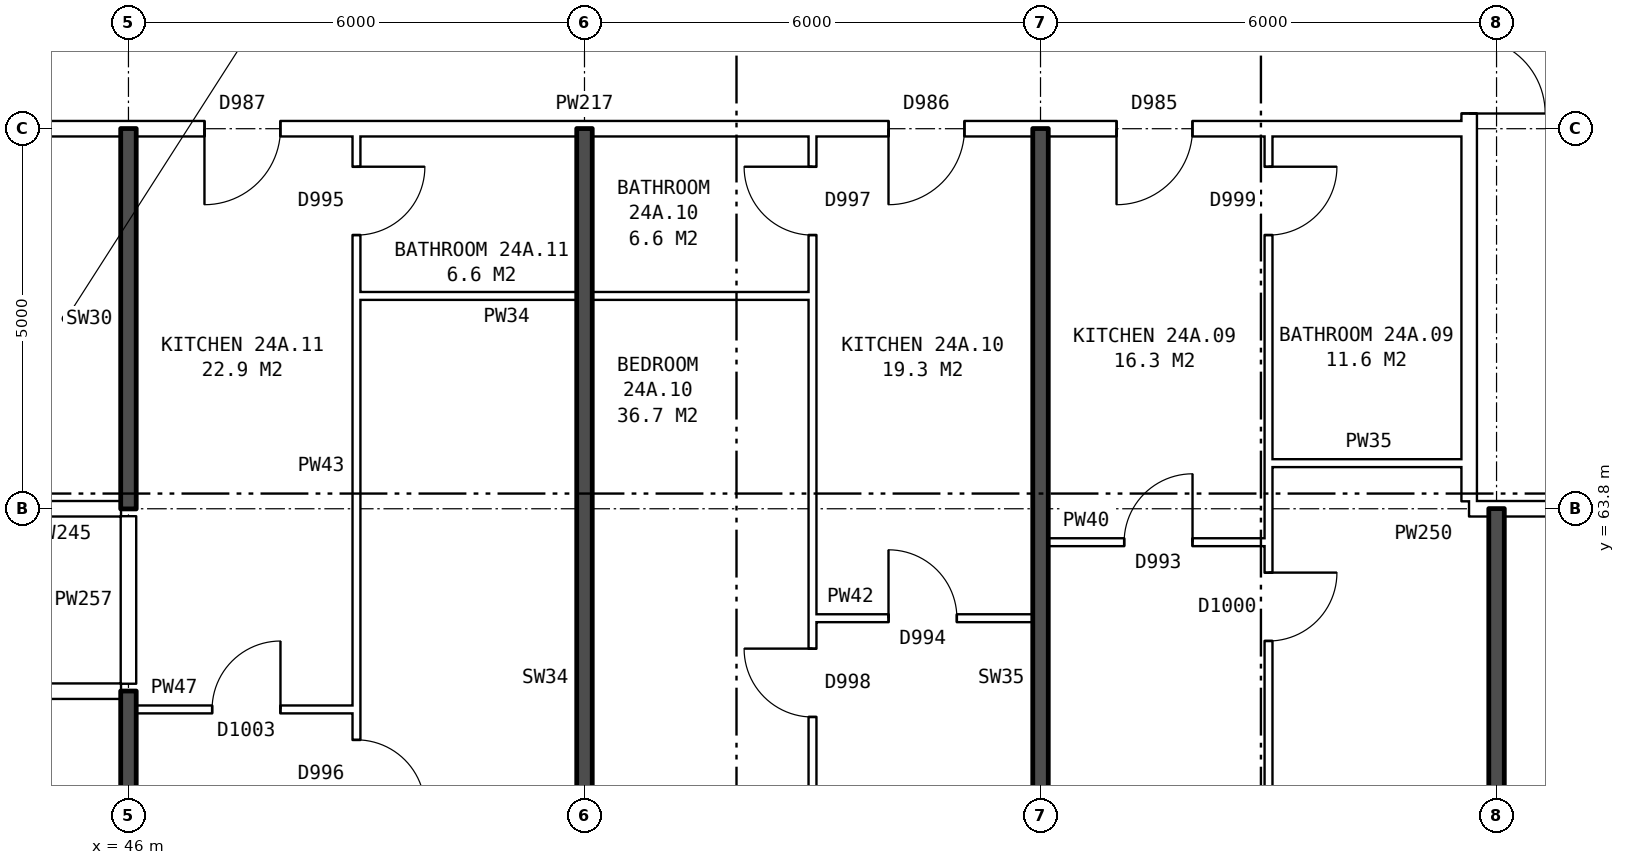
"""IFC4 building model, lengths in metres.
Left out: names, types, materials, properties, quantities, classifications, styles, units other than length and angle.
Written with IfcOpenShell. Run it as: python <this file> out.ifc"""

import sys

from ifc_helpers import new_model, si_unit, direction, frame, frame_2d, origin, place, context, subcontext, project, spatial, rectangle, extrude, element, fill, save


model = new_model("IFC4")
c1 = context("Model", 3, precision=1e-05, world=origin(), true_north=direction((0.0, 1.0)))
c2 = subcontext(c1, "Body", "Model", "MODEL_VIEW")
j1 = project(units=[si_unit("LENGTHUNIT", "METRE"), si_unit("PLANEANGLEUNIT", "RADIAN")], contexts=[c1])
p1 = place(None, origin())
s1 = spatial("IfcSite", under=j1, at=p1, CompositionType="ELEMENT")
p2 = place(p1, origin())
s2 = spatial("IfcBuilding", under=s1, at=p2, CompositionType="ELEMENT")
p3 = place(p2, frame((0.0, 0.0, 87.1)))
s3 = spatial("IfcBuildingStorey", under=s2, at=p3, CompositionType="ELEMENT", Elevation=87.1)
p4 = place(p3, frame((63.64, 63.9, 0.0), z_axis=(0.0, 0.0, 1.0), x_axis=(0.0, 1.0, 0.0)))
e1 = element("IfcWall", 1, at=p4, inside=s3, PredefinedType="PARTITIONING", context=c2, shape_type="SweptSolid", body=[
    extrude(rectangle(XDim=12.2, YDim=0.2, at=frame_2d((6.1, 0.0))), origin(), (0.0, 0.0, 1.0), 2.85),
])
p5 = place(p4, frame((5.1, 0.0, 0.0)))
e2 = element("IfcOpeningElement", 2, at=p5, cuts=e1, PredefinedType="OPENING", context=c2, shape_type="SweptSolid", body=[
    extrude(rectangle(XDim=2.0, YDim=2.1, at=frame_2d((1.0, 1.05))), frame((0.0, 0.11, 0.0), z_axis=(0.0, -1.0, 0.0), x_axis=(1.0, 0.0, 0.0)), (0.0, 0.0, 1.0), 0.22),
])
p6 = place(p3, frame((46.1, 61.16, 0.0), z_axis=(0.0, 0.0, 1.0), x_axis=(1.0, 0.0, 0.0)))
e3 = element("IfcWall", 3, at=p6, inside=s3, PredefinedType="PARTITIONING", context=c2, shape_type="SweptSolid", body=[
    extrude(rectangle(XDim=2.9, YDim=0.1, at=frame_2d((1.45, 0.0))), origin(), (0.0, 0.0, 1.0), 2.85),
])
p7 = place(p6, frame((1.0, 0.0, 0.0)))
e4 = element("IfcOpeningElement", 4, at=p7, cuts=e3, PredefinedType="OPENING", context=c2, shape_type="SweptSolid", body=[
    extrude(rectangle(XDim=0.9, YDim=2.1, at=frame_2d((0.45, 1.05))), frame((0.0, 0.06, 0.0), z_axis=(0.0, -1.0, 0.0), x_axis=(1.0, 0.0, 0.0)), (0.0, 0.0, 1.0), 0.12),
])
p8 = place(p3, frame((23.61, 61.4, 0.0), z_axis=(0.0, 0.0, 1.0), x_axis=(1.0, 0.0, 0.0)))
e5 = element("IfcWall", 5, at=p8, inside=s3, PredefinedType="PARTITIONING", context=c2, shape_type="SweptSolid", body=[
    extrude(rectangle(XDim=22.29, YDim=0.2, at=frame_2d((11.145, 0.0))), origin(), (0.0, 0.0, 1.0), 2.85),
])
p9 = place(p8, frame((18.84, 0.0, 0.0)))
e6 = element("IfcOpeningElement", 6, at=p9, cuts=e5, PredefinedType="OPENING", context=c2, shape_type="SweptSolid", body=[
    extrude(rectangle(XDim=1.0, YDim=2.1, at=frame_2d((0.5, 1.05))), frame((0.0, 0.11, 0.0), z_axis=(0.0, -1.0, 0.0), x_axis=(1.0, 0.0, 0.0)), (0.0, 0.0, 1.0), 0.22),
])
p10 = place(p8, frame((6.89, 0.0, 0.0)))
e7 = element("IfcOpeningElement", 7, at=p10, cuts=e5, PredefinedType="OPENING", context=c2, shape_type="SweptSolid", body=[
    extrude(rectangle(XDim=1.0, YDim=2.1, at=frame_2d((0.5, 1.05))), frame((0.0, 0.11, 0.0), z_axis=(0.0, -1.0, 0.0), x_axis=(1.0, 0.0, 0.0)), (0.0, 0.0, 1.0), 0.22),
])
p11 = place(p3, frame((55.0, 62.36, 0.0), z_axis=(0.0, 0.0, 1.0), x_axis=(1.0, 0.0, 0.0)))
e8 = element("IfcWall", 8, at=p11, inside=s3, PredefinedType="PARTITIONING", context=c2, shape_type="SweptSolid", body=[
    extrude(rectangle(XDim=2.9, YDim=0.1, at=frame_2d((1.45, 0.0))), origin(), (0.0, 0.0, 1.0), 2.85),
])
p12 = place(p11, frame((1.0, 0.0, 0.0)))
e9 = element("IfcOpeningElement", 9, at=p12, cuts=e8, PredefinedType="OPENING", context=c2, shape_type="SweptSolid", body=[
    extrude(rectangle(XDim=0.9, YDim=2.1, at=frame_2d((0.45, 1.05))), frame((0.0, 0.06, 0.0), z_axis=(0.0, -1.0, 0.0), x_axis=(1.0, 0.0, 0.0)), (0.0, 0.0, 1.0), 0.12),
])
p13 = place(p3, frame((58.1, 63.36, 0.0), z_axis=(0.0, 0.0, 1.0), x_axis=(1.0, 0.0, 0.0)))
e10 = element("IfcWall", 10, at=p13, inside=s3, PredefinedType="PARTITIONING", context=c2, shape_type="SweptSolid", body=[
    extrude(rectangle(XDim=2.9, YDim=0.1, at=frame_2d((1.45, 0.0))), origin(), (0.0, 0.0, 1.0), 2.85),
])
p14 = place(p13, frame((1.0, 0.0, 0.0)))
e11 = element("IfcOpeningElement", 11, at=p14, cuts=e10, PredefinedType="OPENING", context=c2, shape_type="SweptSolid", body=[
    extrude(rectangle(XDim=0.9, YDim=2.1, at=frame_2d((0.45, 1.05))), frame((0.0, 0.06, 0.0), z_axis=(0.0, -1.0, 0.0), x_axis=(1.0, 0.0, 0.0)), (0.0, 0.0, 1.0), 0.12),
])
p15 = place(p3, frame((44.36, 63.8, 0.0), z_axis=(0.0, 0.0, 1.0), x_axis=(1.0, 0.0, 0.0)))
e12 = element("IfcWall", 12, at=p15, inside=s3, PredefinedType="PARTITIONING", context=c2, shape_type="SweptSolid", body=[
    extrude(rectangle(XDim=1.54, YDim=0.2, at=frame_2d((0.77, 0.0))), origin(), (0.0, 0.0, 1.0), 2.85),
])
p16 = place(p3, frame((63.64, 63.8, 0.0), z_axis=(0.0, 0.0, 1.0), x_axis=(1.0, 0.0, 0.0)))
e13 = element("IfcWall", 13, at=p16, inside=s3, PredefinedType="PARTITIONING", context=c2, shape_type="SweptSolid", body=[
    extrude(rectangle(XDim=3.0, YDim=0.2, at=frame_2d((1.5, 0.0))), origin(), (0.0, 0.0, 1.0), 2.85),
])
p17 = place(p16, frame((1.18, 0.0, 0.0)))
e14 = element("IfcOpeningElement", 14, at=p17, cuts=e13, PredefinedType="OPENING", context=c2, shape_type="SweptSolid", body=[
    extrude(rectangle(XDim=1.0, YDim=2.1, at=frame_2d((0.5, 1.05))), frame((0.0, 0.11, 0.0), z_axis=(0.0, -1.0, 0.0), x_axis=(1.0, 0.0, 0.0)), (0.0, 0.0, 1.0), 0.22),
])
p18 = place(p3, frame((61.0, 64.4, 0.0), z_axis=(0.0, 0.0, 1.0), x_axis=(1.0, 0.0, 0.0)))
e15 = element("IfcWall", 15, at=p18, inside=s3, PredefinedType="PARTITIONING", context=c2, shape_type="SweptSolid", body=[
    extrude(rectangle(XDim=2.64, YDim=0.1, at=frame_2d((1.32, 0.0))), origin(), (0.0, 0.0, 1.0), 2.85),
])
p19 = place(p3, frame((49.0, 66.6, 0.0), z_axis=(0.0, 0.0, 1.0), x_axis=(1.0, 0.0, 0.0)))
e16 = element("IfcWall", 16, at=p19, inside=s3, PredefinedType="PARTITIONING", context=c2, shape_type="SweptSolid", body=[
    extrude(rectangle(XDim=6.0, YDim=0.1, at=frame_2d((3.0, 0.0))), origin(), (0.0, 0.0, 1.0), 2.85),
])
p20 = place(p3, frame((44.36, 68.8, 0.0), z_axis=(0.0, 0.0, 1.0), x_axis=(1.0, 0.0, 0.0)))
e17 = element("IfcWall", 17, at=p20, inside=s3, PredefinedType="PARTITIONING", context=c2, shape_type="SweptSolid", body=[
    extrude(rectangle(XDim=19.28, YDim=0.2, at=frame_2d((9.64, 0.0))), origin(), (0.0, 0.0, 1.0), 2.85),
])
p21 = place(p20, frame((14.64, 0.0, 0.0)))
e18 = element("IfcOpeningElement", 18, at=p21, cuts=e17, PredefinedType="OPENING", context=c2, shape_type="SweptSolid", body=[
    extrude(rectangle(XDim=1.0, YDim=2.1, at=frame_2d((0.5, 1.05))), frame((0.0, 0.11, 0.0), z_axis=(0.0, -1.0, 0.0), x_axis=(1.0, 0.0, 0.0)), (0.0, 0.0, 1.0), 0.22),
])
p22 = place(p20, frame((11.64, 0.0, 0.0)))
e19 = element("IfcOpeningElement", 19, at=p22, cuts=e17, PredefinedType="OPENING", context=c2, shape_type="SweptSolid", body=[
    extrude(rectangle(XDim=1.0, YDim=2.1, at=frame_2d((0.5, 1.05))), frame((0.0, 0.11, 0.0), z_axis=(0.0, -1.0, 0.0), x_axis=(1.0, 0.0, 0.0)), (0.0, 0.0, 1.0), 0.22),
])
p23 = place(p20, frame((2.64, 0.0, 0.0)))
e20 = element("IfcOpeningElement", 20, at=p23, cuts=e17, PredefinedType="OPENING", context=c2, shape_type="SweptSolid", body=[
    extrude(rectangle(XDim=1.0, YDim=2.1, at=frame_2d((0.5, 1.05))), frame((0.0, 0.11, 0.0), z_axis=(0.0, -1.0, 0.0), x_axis=(1.0, 0.0, 0.0)), (0.0, 0.0, 1.0), 0.22),
])
p24 = place(p3, frame((46.0, 54.36, 0.0), z_axis=(0.0, 0.0, 1.0), x_axis=(0.0, 1.0, 0.0)))
e21 = element("IfcWall", 21, at=p24, inside=s3, PredefinedType="SOLIDWALL", context=c2, shape_type="SweptSolid", body=[
    extrude(rectangle(XDim=7.04, YDim=0.2, at=frame_2d((3.52, 0.0))), origin(), (0.0, 0.0, 1.0), 2.85),
])
p25 = place(p3, frame((46.0, 61.5, 0.0), z_axis=(0.0, 0.0, 1.0), x_axis=(0.0, 1.0, 0.0)))
e22 = element("IfcWall", 22, at=p25, inside=s3, PredefinedType="PARTITIONING", context=c2, shape_type="SweptSolid", body=[
    extrude(rectangle(XDim=2.2, YDim=0.2, at=frame_2d((1.1, 0.0))), origin(), (0.0, 0.0, 1.0), 2.85),
])
p26 = place(p3, frame((46.0, 63.8, 0.0), z_axis=(0.0, 0.0, 1.0), x_axis=(0.0, 1.0, 0.0)))
e23 = element("IfcWall", 23, at=p26, inside=s3, PredefinedType="SOLIDWALL", context=c2, shape_type="SweptSolid", body=[
    extrude(rectangle(XDim=5.0, YDim=0.2, at=frame_2d((2.5, 0.0))), origin(), (0.0, 0.0, 1.0), 2.85),
])
p27 = place(p3, frame((49.0, 54.36, 0.0), z_axis=(0.0, 0.0, 1.0), x_axis=(0.0, 1.0, 0.0)))
e24 = element("IfcWall", 24, at=p27, inside=s3, PredefinedType="PARTITIONING", context=c2, shape_type="SweptSolid", body=[
    extrude(rectangle(XDim=14.34, YDim=0.1, at=frame_2d((7.17, 0.0))), origin(), (0.0, 0.0, 1.0), 2.85),
])
p28 = place(p27, frame((5.5, 0.0, 0.0)))
e25 = element("IfcOpeningElement", 25, at=p28, cuts=e24, PredefinedType="OPENING", context=c2, shape_type="SweptSolid", body=[
    extrude(rectangle(XDim=0.9, YDim=2.1, at=frame_2d((0.45, 1.05))), frame((0.0, 0.06, 0.0), z_axis=(0.0, -1.0, 0.0), x_axis=(1.0, 0.0, 0.0)), (0.0, 0.0, 1.0), 0.12),
])
p29 = place(p27, frame((13.04, 0.0, 0.0)))
e26 = element("IfcOpeningElement", 26, at=p29, cuts=e24, PredefinedType="OPENING", context=c2, shape_type="SweptSolid", body=[
    extrude(rectangle(XDim=0.9, YDim=2.1, at=frame_2d((0.45, 1.05))), frame((0.0, 0.06, 0.0), z_axis=(0.0, -1.0, 0.0), x_axis=(1.0, 0.0, 0.0)), (0.0, 0.0, 1.0), 0.12),
])
p30 = place(p3, frame((52.0, 54.36, 0.0), z_axis=(0.0, 0.0, 1.0), x_axis=(0.0, 1.0, 0.0)))
e27 = element("IfcWall", 27, at=p30, inside=s3, PredefinedType="SOLIDWALL", context=c2, shape_type="SweptSolid", body=[
    extrude(rectangle(XDim=14.44, YDim=0.2, at=frame_2d((7.22, 0.0))), origin(), (0.0, 0.0, 1.0), 2.85),
])
p31 = place(p3, frame((55.0, 54.36, 0.0), z_axis=(0.0, 0.0, 1.0), x_axis=(0.0, 1.0, 0.0)))
e28 = element("IfcWall", 28, at=p31, inside=s3, PredefinedType="PARTITIONING", context=c2, shape_type="SweptSolid", body=[
    extrude(rectangle(XDim=14.34, YDim=0.1, at=frame_2d((7.17, 0.0))), origin(), (0.0, 0.0, 1.0), 2.85),
])
p32 = place(p31, frame((6.7, 0.0, 0.0)))
e29 = element("IfcOpeningElement", 29, at=p32, cuts=e28, PredefinedType="OPENING", context=c2, shape_type="SweptSolid", body=[
    extrude(rectangle(XDim=0.9, YDim=2.1, at=frame_2d((0.45, 1.05))), frame((0.0, 0.06, 0.0), z_axis=(0.0, -1.0, 0.0), x_axis=(1.0, 0.0, 0.0)), (0.0, 0.0, 1.0), 0.12),
])
p33 = place(p31, frame((13.04, 0.0, 0.0)))
e30 = element("IfcOpeningElement", 30, at=p33, cuts=e28, PredefinedType="OPENING", context=c2, shape_type="SweptSolid", body=[
    extrude(rectangle(XDim=0.9, YDim=2.1, at=frame_2d((0.45, 1.05))), frame((0.0, 0.06, 0.0), z_axis=(0.0, -1.0, 0.0), x_axis=(1.0, 0.0, 0.0)), (0.0, 0.0, 1.0), 0.12),
])
p34 = place(p3, frame((58.0, 54.36, 0.0), z_axis=(0.0, 0.0, 1.0), x_axis=(0.0, 1.0, 0.0)))
e31 = element("IfcWall", 31, at=p34, inside=s3, PredefinedType="SOLIDWALL", context=c2, shape_type="SweptSolid", body=[
    extrude(rectangle(XDim=14.44, YDim=0.2, at=frame_2d((7.22, 0.0))), origin(), (0.0, 0.0, 1.0), 2.85),
])
p35 = place(p3, frame((61.0, 54.36, 0.0), z_axis=(0.0, 0.0, 1.0), x_axis=(0.0, 1.0, 0.0)))
e32 = element("IfcWall", 32, at=p35, inside=s3, PredefinedType="PARTITIONING", context=c2, shape_type="SweptSolid", body=[
    extrude(rectangle(XDim=14.34, YDim=0.1, at=frame_2d((7.17, 0.0))), origin(), (0.0, 0.0, 1.0), 2.85),
])
p36 = place(p35, frame((7.7, 0.0, 0.0)))
e33 = element("IfcOpeningElement", 33, at=p36, cuts=e32, PredefinedType="OPENING", context=c2, shape_type="SweptSolid", body=[
    extrude(rectangle(XDim=0.9, YDim=2.1, at=frame_2d((0.45, 1.05))), frame((0.0, 0.06, 0.0), z_axis=(0.0, -1.0, 0.0), x_axis=(1.0, 0.0, 0.0)), (0.0, 0.0, 1.0), 0.12),
])
p37 = place(p35, frame((13.04, 0.0, 0.0)))
e34 = element("IfcOpeningElement", 34, at=p37, cuts=e32, PredefinedType="OPENING", context=c2, shape_type="SweptSolid", body=[
    extrude(rectangle(XDim=0.9, YDim=2.1, at=frame_2d((0.45, 1.05))), frame((0.0, 0.06, 0.0), z_axis=(0.0, -1.0, 0.0), x_axis=(1.0, 0.0, 0.0)), (0.0, 0.0, 1.0), 0.12),
])
p38 = place(p3, frame((64.0, 54.36, 0.0), z_axis=(0.0, 0.0, 1.0), x_axis=(0.0, 1.0, 0.0)))
e35 = element("IfcWall", 35, at=p38, inside=s3, PredefinedType="SOLIDWALL", context=c2, shape_type="SweptSolid", body=[
    extrude(rectangle(XDim=9.44, YDim=0.2, at=frame_2d((4.72, 0.0))), origin(), (0.0, 0.0, 1.0), 2.85),
])
p39 = place(p5, frame((2.0, 0.0, 0.0), z_axis=(0.0, 0.0, 1.0), x_axis=(-1.0, 0.0, 0.0)))
e36 = element("IfcDoor", 36, at=p39, inside=s3, OperationType="DOUBLE_DOOR_SINGLE_SWING", PredefinedType="DOOR", context=c2, shape_type="SweptSolid", body=[
    extrude(rectangle(XDim=2.0, YDim=2.1, at=frame_2d((1.0, 1.05))), frame((0.0, 0.025, 0.0), z_axis=(0.0, -1.0, 0.0), x_axis=(1.0, 0.0, 0.0)), (0.0, 0.0, 1.0), 0.05),
])
fill(e2, e36)
p40 = place(p36, frame((0.9, 0.0, 0.0), z_axis=(0.0, 0.0, 1.0), x_axis=(-1.0, 0.0, 0.0)))
e37 = element("IfcDoor", 37, at=p40, inside=s3, OperationType="SINGLE_SWING_LEFT", PredefinedType="DOOR", context=c2, shape_type="SweptSolid", body=[
    extrude(rectangle(XDim=0.9, YDim=2.1, at=frame_2d((0.45, 1.05))), frame((0.0, 0.025, 0.0), z_axis=(0.0, -1.0, 0.0), x_axis=(1.0, 0.0, 0.0)), (0.0, 0.0, 1.0), 0.05),
])
fill(e33, e37)
p41 = place(p21, frame((1.0, 0.0, 0.0), z_axis=(0.0, 0.0, 1.0), x_axis=(-1.0, 0.0, 0.0)))
e38 = element("IfcDoor", 38, at=p41, inside=s3, OperationType="SINGLE_SWING_RIGHT", PredefinedType="DOOR", context=c2, shape_type="SweptSolid", body=[
    extrude(rectangle(XDim=1.0, YDim=2.1, at=frame_2d((0.5, 1.05))), frame((0.0, 0.025, 0.0), z_axis=(0.0, -1.0, 0.0), x_axis=(1.0, 0.0, 0.0)), (0.0, 0.0, 1.0), 0.05),
])
fill(e18, e38)
p42 = place(p14, origin())
e39 = element("IfcDoor", 39, at=p42, inside=s3, OperationType="SINGLE_SWING_RIGHT", PredefinedType="DOOR", context=c2, shape_type="SweptSolid", body=[
    extrude(rectangle(XDim=0.9, YDim=2.1, at=frame_2d((0.45, 1.05))), frame((0.0, 0.025, 0.0), z_axis=(0.0, -1.0, 0.0), x_axis=(1.0, 0.0, 0.0)), (0.0, 0.0, 1.0), 0.05),
])
fill(e11, e39)
p43 = place(p37, frame((0.9, 0.0, 0.0), z_axis=(0.0, 0.0, 1.0), x_axis=(-1.0, 0.0, 0.0)))
e40 = element("IfcDoor", 40, at=p43, inside=s3, OperationType="SINGLE_SWING_LEFT", PredefinedType="DOOR", context=c2, shape_type="SweptSolid", body=[
    extrude(rectangle(XDim=0.9, YDim=2.1, at=frame_2d((0.45, 1.05))), frame((0.0, 0.025, 0.0), z_axis=(0.0, -1.0, 0.0), x_axis=(1.0, 0.0, 0.0)), (0.0, 0.0, 1.0), 0.05),
])
fill(e34, e40)
p44 = place(p32, origin())
e41 = element("IfcDoor", 41, at=p44, inside=s3, OperationType="SINGLE_SWING_RIGHT", PredefinedType="DOOR", context=c2, shape_type="SweptSolid", body=[
    extrude(rectangle(XDim=0.9, YDim=2.1, at=frame_2d((0.45, 1.05))), frame((0.0, 0.025, 0.0), z_axis=(0.0, -1.0, 0.0), x_axis=(1.0, 0.0, 0.0)), (0.0, 0.0, 1.0), 0.05),
])
fill(e29, e41)
p45 = place(p22, frame((1.0, 0.0, 0.0), z_axis=(0.0, 0.0, 1.0), x_axis=(-1.0, 0.0, 0.0)))
e42 = element("IfcDoor", 42, at=p45, inside=s3, OperationType="SINGLE_SWING_RIGHT", PredefinedType="DOOR", context=c2, shape_type="SweptSolid", body=[
    extrude(rectangle(XDim=1.0, YDim=2.1, at=frame_2d((0.5, 1.05))), frame((0.0, 0.025, 0.0), z_axis=(0.0, -1.0, 0.0), x_axis=(1.0, 0.0, 0.0)), (0.0, 0.0, 1.0), 0.05),
])
fill(e19, e42)
p46 = place(p12, origin())
e43 = element("IfcDoor", 43, at=p46, inside=s3, OperationType="SINGLE_SWING_LEFT", PredefinedType="DOOR", context=c2, shape_type="SweptSolid", body=[
    extrude(rectangle(XDim=0.9, YDim=2.1, at=frame_2d((0.45, 1.05))), frame((0.0, 0.025, 0.0), z_axis=(0.0, -1.0, 0.0), x_axis=(1.0, 0.0, 0.0)), (0.0, 0.0, 1.0), 0.05),
])
fill(e9, e43)
p47 = place(p33, origin())
e44 = element("IfcDoor", 44, at=p47, inside=s3, OperationType="SINGLE_SWING_RIGHT", PredefinedType="DOOR", context=c2, shape_type="SweptSolid", body=[
    extrude(rectangle(XDim=0.9, YDim=2.1, at=frame_2d((0.45, 1.05))), frame((0.0, 0.025, 0.0), z_axis=(0.0, -1.0, 0.0), x_axis=(1.0, 0.0, 0.0)), (0.0, 0.0, 1.0), 0.05),
])
fill(e30, e44)
p48 = place(p28, frame((0.9, 0.0, 0.0), z_axis=(0.0, 0.0, 1.0), x_axis=(-1.0, 0.0, 0.0)))
e45 = element("IfcDoor", 45, at=p48, inside=s3, OperationType="SINGLE_SWING_RIGHT", PredefinedType="DOOR", context=c2, shape_type="SweptSolid", body=[
    extrude(rectangle(XDim=0.9, YDim=2.1, at=frame_2d((0.45, 1.05))), frame((0.0, 0.025, 0.0), z_axis=(0.0, -1.0, 0.0), x_axis=(1.0, 0.0, 0.0)), (0.0, 0.0, 1.0), 0.05),
])
fill(e25, e45)
p49 = place(p23, frame((1.0, 0.0, 0.0), z_axis=(0.0, 0.0, 1.0), x_axis=(-1.0, 0.0, 0.0)))
e46 = element("IfcDoor", 46, at=p49, inside=s3, OperationType="SINGLE_SWING_RIGHT", PredefinedType="DOOR", context=c2, shape_type="SweptSolid", body=[
    extrude(rectangle(XDim=1.0, YDim=2.1, at=frame_2d((0.5, 1.05))), frame((0.0, 0.025, 0.0), z_axis=(0.0, -1.0, 0.0), x_axis=(1.0, 0.0, 0.0)), (0.0, 0.0, 1.0), 0.05),
])
fill(e20, e46)
p50 = place(p7, origin())
e47 = element("IfcDoor", 47, at=p50, inside=s3, OperationType="SINGLE_SWING_RIGHT", PredefinedType="DOOR", context=c2, shape_type="SweptSolid", body=[
    extrude(rectangle(XDim=0.9, YDim=2.1, at=frame_2d((0.45, 1.05))), frame((0.0, 0.025, 0.0), z_axis=(0.0, -1.0, 0.0), x_axis=(1.0, 0.0, 0.0)), (0.0, 0.0, 1.0), 0.05),
])
fill(e4, e47)
p51 = place(p29, frame((0.9, 0.0, 0.0), z_axis=(0.0, 0.0, 1.0), x_axis=(-1.0, 0.0, 0.0)))
e48 = element("IfcDoor", 48, at=p51, inside=s3, OperationType="SINGLE_SWING_LEFT", PredefinedType="DOOR", context=c2, shape_type="SweptSolid", body=[
    extrude(rectangle(XDim=0.9, YDim=2.1, at=frame_2d((0.45, 1.05))), frame((0.0, 0.025, 0.0), z_axis=(0.0, -1.0, 0.0), x_axis=(1.0, 0.0, 0.0)), (0.0, 0.0, 1.0), 0.05),
])
fill(e26, e48)
save(model, sys.argv[1])
